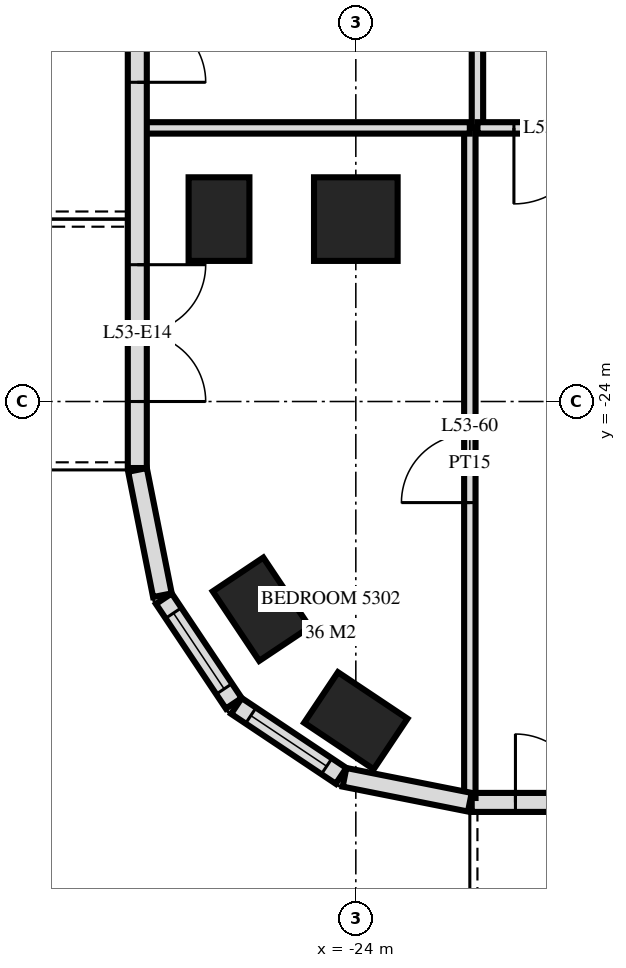
"""IFC4 building model, lengths in metres.
Left out: names, types, materials, properties, quantities, classifications, styles, units other than length and angle.
Written with IfcOpenShell. Run it as: python <this file> out.ifc"""

import sys

from ifc_helpers import new_model, si_unit, direction, frame, frame_2d, origin, origin_2d, place, context, subcontext, project, spatial, rectangle, extrude, element, fill, save


model = new_model("IFC4")
c1 = context("Model", 3, precision=1e-05, world=origin(), true_north=direction((0.0, 1.0)))
c2 = subcontext(c1, "Body", "Model", "MODEL_VIEW")
j1 = project(units=[si_unit("LENGTHUNIT", "METRE"), si_unit("PLANEANGLEUNIT", "RADIAN")], contexts=[c1])
p1 = place(None, origin())
s1 = spatial("IfcSite", under=j1, at=p1, CompositionType="ELEMENT")
p2 = place(p1, origin())
s2 = spatial("IfcBuilding", under=s1, at=p2, CompositionType="ELEMENT")
p3 = place(p2, frame((0.0, 0.0, 204.6)))
s3 = spatial("IfcBuildingStorey", under=s2, at=p3, CompositionType="ELEMENT", Elevation=204.6)
for number, where, z_axis, x_axis in (
    (1, (-25.8, -21.6, 0.0), (0.0, 0.0, 1.0), (0.0, 1.0, 0.0)),
    (2, (-25.244, -26.733, 0.0), (0.0, 0.0, 1.0), (-0.556, 0.831, 0.0)),
    (3, (-24.0, -28.2, 0.0), (0.0, 0.0, 1.0), (-0.831, 0.556, 0.0)),
):
    element("IfcColumn", number, at=place(p3, frame(where, z_axis=z_axis, x_axis=x_axis)), inside=s3, PredefinedType="COLUMN", context=c2, shape_type="SweptSolid", body=[
        extrude(rectangle(XDim=1.1, YDim=0.8, at=origin_2d()), origin(), (0.0, 0.0, 1.0), 3.5),
    ])
p4 = place(p3, frame((-24.0, -21.6, 0.0), z_axis=(0.0, 0.0, 1.0), x_axis=(1.0, 0.0, 0.0)))
e4 = element("IfcColumn", 4, at=p4, inside=s3, PredefinedType="COLUMN", context=c2, shape_type="SweptSolid", body=[
    extrude(rectangle(XDim=1.1, YDim=1.1, at=origin_2d()), origin(), (0.0, 0.0, 1.0), 3.5),
])
p5 = place(p3, frame((-26.875, -3.325, 0.0), z_axis=(0.0, 0.0, 1.0), x_axis=(0.0, -1.0, 0.0)))
e5 = element("IfcWall", 5, at=p5, inside=s3, PredefinedType="SOLIDWALL", context=c2, shape_type="SweptSolid", body=[
    extrude(rectangle(XDim=21.551, YDim=0.25, at=frame_2d((10.775, 0.0))), origin(), (0.0, 0.0, 1.0), 3.22),
])
p6 = place(p5, frame((6.65, 0.0, 0.0)))
e6 = element("IfcOpeningElement", 6, at=p6, cuts=e5, PredefinedType="OPENING", context=c2, shape_type="SweptSolid", body=[
    extrude(rectangle(XDim=1.8, YDim=2.4, at=frame_2d((0.9, 1.2))), frame((0.0, 0.135, 0.0), z_axis=(0.0, -1.0, 0.0), x_axis=(1.0, 0.0, 0.0)), (0.0, 0.0, 1.0), 0.27),
])
p7 = place(p5, frame((12.275, 0.0, 0.9)))
e7 = element("IfcOpeningElement", 7, at=p7, cuts=e5, PredefinedType="OPENING", context=c2, shape_type="SweptSolid", body=[
    extrude(rectangle(XDim=1.2, YDim=1.5, at=frame_2d((0.6, 0.75))), frame((0.0, 0.135, 0.0), z_axis=(0.0, -1.0, 0.0), x_axis=(1.0, 0.0, 0.0)), (0.0, 0.0, 1.0), 0.27),
])
p8 = place(p5, frame((14.675, 0.0, 0.0)))
e8 = element("IfcOpeningElement", 8, at=p8, cuts=e5, PredefinedType="OPENING", context=c2, shape_type="SweptSolid", body=[
    extrude(rectangle(XDim=1.8, YDim=2.4, at=frame_2d((0.9, 1.2))), frame((0.0, 0.135, 0.0), z_axis=(0.0, -1.0, 0.0), x_axis=(1.0, 0.0, 0.0)), (0.0, 0.0, 1.0), 0.27),
])
p9 = place(p5, frame((18.875, 0.0, 0.0)))
e9 = element("IfcOpeningElement", 9, at=p9, cuts=e5, PredefinedType="OPENING", context=c2, shape_type="SweptSolid", body=[
    extrude(rectangle(XDim=1.8, YDim=2.4, at=frame_2d((0.9, 1.2))), frame((0.0, 0.135, 0.0), z_axis=(0.0, -1.0, 0.0), x_axis=(1.0, 0.0, 0.0)), (0.0, 0.0, 1.0), 0.27),
])
p10 = place(p3, frame((-26.873, -24.9, 0.0), z_axis=(0.0, 0.0, 1.0), x_axis=(0.195026884138, -0.980797896849, 0.0)))
e10 = element("IfcWall", 10, at=p10, inside=s3, PredefinedType="SOLIDWALL", context=c2, shape_type="SweptSolid", body=[
    extrude(rectangle(XDim=1.681, YDim=0.25, at=frame_2d((0.841, 0.0))), origin(), (0.0, 0.0, 1.0), 3.22),
])
p11 = place(p3, frame((-26.526, -26.594, 0.0), z_axis=(0.0, 0.0, 1.0), x_axis=(0.55555029066, -0.831482937015, 0.0)))
e11 = element("IfcWall", 11, at=p11, inside=s3, PredefinedType="SOLIDWALL", context=c2, shape_type="SweptSolid", body=[
    extrude(rectangle(XDim=1.656, YDim=0.25, at=frame_2d((0.828, 0.0))), origin(), (0.0, 0.0, 1.0), 3.22),
])
p12 = place(p11, frame((0.228, 0.0, 0.9)))
e12 = element("IfcOpeningElement", 12, at=p12, cuts=e11, PredefinedType="OPENING", context=c2, shape_type="SweptSolid", body=[
    extrude(rectangle(XDim=1.2, YDim=1.5, at=frame_2d((0.6, 0.75))), frame((0.0, 0.135, 0.0), z_axis=(0.0, -1.0, 0.0), x_axis=(1.0, 0.0, 0.0)), (0.0, 0.0, 1.0), 0.27),
])
p13 = place(p3, frame((-25.571, -28.006, 0.0), z_axis=(0.0, 0.0, 1.0), x_axis=(0.831482937015, -0.55555029066, 0.0)))
e13 = element("IfcWall", 13, at=p13, inside=s3, PredefinedType="SOLIDWALL", context=c2, shape_type="SweptSolid", body=[
    extrude(rectangle(XDim=1.656, YDim=0.25, at=frame_2d((0.828, 0.0))), origin(), (0.0, 0.0, 1.0), 3.22),
])
p14 = place(p13, frame((0.228, 0.0, 0.9)))
e14 = element("IfcOpeningElement", 14, at=p14, cuts=e13, PredefinedType="OPENING", context=c2, shape_type="SweptSolid", body=[
    extrude(rectangle(XDim=1.2, YDim=1.5, at=frame_2d((0.6, 0.75))), frame((0.0, 0.135, 0.0), z_axis=(0.0, -1.0, 0.0), x_axis=(1.0, 0.0, 0.0)), (0.0, 0.0, 1.0), 0.27),
])
p15 = place(p3, frame((-24.149, -28.945, 0.0), z_axis=(0.0, 0.0, 1.0), x_axis=(0.980775640221, -0.19513878023, 0.0)))
e15 = element("IfcWall", 15, at=p15, inside=s3, PredefinedType="SOLIDWALL", context=c2, shape_type="SweptSolid", body=[
    extrude(rectangle(XDim=1.681, YDim=0.25, at=frame_2d((0.841, 0.0))), origin(), (0.0, 0.0, 1.0), 3.22),
])
p16 = place(p3, frame((-22.475, -29.275, 0.0), z_axis=(0.0, 0.0, 1.0), x_axis=(1.0, 0.0, 0.0)))
e16 = element("IfcWall", 16, at=p16, inside=s3, PredefinedType="SOLIDWALL", context=c2, shape_type="SweptSolid", body=[
    extrude(rectangle(XDim=44.951, YDim=0.25, at=frame_2d((22.475, 0.0))), origin(), (0.0, 0.0, 1.0), 3.22),
])
p17 = place(p16, frame((0.575, 0.0, 0.0)))
e17 = element("IfcOpeningElement", 17, at=p17, cuts=e16, PredefinedType="OPENING", context=c2, shape_type="SweptSolid", body=[
    extrude(rectangle(XDim=1.8, YDim=2.4, at=frame_2d((0.9, 1.2))), frame((0.0, 0.135, 0.0), z_axis=(0.0, -1.0, 0.0), x_axis=(1.0, 0.0, 0.0)), (0.0, 0.0, 1.0), 0.27),
])
p18 = place(p16, frame((6.2, 0.0, 0.0)))
e18 = element("IfcOpeningElement", 18, at=p18, cuts=e16, PredefinedType="OPENING", context=c2, shape_type="SweptSolid", body=[
    extrude(rectangle(XDim=1.8, YDim=2.4, at=frame_2d((0.9, 1.2))), frame((0.0, 0.135, 0.0), z_axis=(0.0, -1.0, 0.0), x_axis=(1.0, 0.0, 0.0)), (0.0, 0.0, 1.0), 0.27),
])
p19 = place(p16, frame((8.45, 0.0, 0.9)))
e19 = element("IfcOpeningElement", 19, at=p19, cuts=e16, PredefinedType="OPENING", context=c2, shape_type="SweptSolid", body=[
    extrude(rectangle(XDim=1.8, YDim=1.5, at=frame_2d((0.9, 0.75))), frame((0.0, 0.135, 0.0), z_axis=(0.0, -1.0, 0.0), x_axis=(1.0, 0.0, 0.0)), (0.0, 0.0, 1.0), 0.27),
])
p20 = place(p16, frame((11.075, 0.0, 0.0)))
e20 = element("IfcOpeningElement", 20, at=p20, cuts=e16, PredefinedType="OPENING", context=c2, shape_type="SweptSolid", body=[
    extrude(rectangle(XDim=1.8, YDim=2.4, at=frame_2d((0.9, 1.2))), frame((0.0, 0.135, 0.0), z_axis=(0.0, -1.0, 0.0), x_axis=(1.0, 0.0, 0.0)), (0.0, 0.0, 1.0), 0.27),
])
p21 = place(p16, frame((13.775, 0.0, 0.9)))
e21 = element("IfcOpeningElement", 21, at=p21, cuts=e16, PredefinedType="OPENING", context=c2, shape_type="SweptSolid", body=[
    extrude(rectangle(XDim=2.4, YDim=1.5, at=frame_2d((1.2, 0.75))), frame((0.0, 0.135, 0.0), z_axis=(0.0, -1.0, 0.0), x_axis=(1.0, 0.0, 0.0)), (0.0, 0.0, 1.0), 0.27),
])
p22 = place(p16, frame((16.775, 0.0, 0.9)))
e22 = element("IfcOpeningElement", 22, at=p22, cuts=e16, PredefinedType="OPENING", context=c2, shape_type="SweptSolid", body=[
    extrude(rectangle(XDim=2.4, YDim=1.5, at=frame_2d((1.2, 0.75))), frame((0.0, 0.135, 0.0), z_axis=(0.0, -1.0, 0.0), x_axis=(1.0, 0.0, 0.0)), (0.0, 0.0, 1.0), 0.27),
])
p23 = place(p16, frame((20.075, 0.0, 0.0)))
e23 = element("IfcOpeningElement", 23, at=p23, cuts=e16, PredefinedType="OPENING", context=c2, shape_type="SweptSolid", body=[
    extrude(rectangle(XDim=1.8, YDim=2.4, at=frame_2d((0.9, 1.2))), frame((0.0, 0.135, 0.0), z_axis=(0.0, -1.0, 0.0), x_axis=(1.0, 0.0, 0.0)), (0.0, 0.0, 1.0), 0.27),
])
p24 = place(p16, frame((23.075, 0.0, 0.0)))
e24 = element("IfcOpeningElement", 24, at=p24, cuts=e16, PredefinedType="OPENING", context=c2, shape_type="SweptSolid", body=[
    extrude(rectangle(XDim=1.8, YDim=2.4, at=frame_2d((0.9, 1.2))), frame((0.0, 0.135, 0.0), z_axis=(0.0, -1.0, 0.0), x_axis=(1.0, 0.0, 0.0)), (0.0, 0.0, 1.0), 0.27),
])
p25 = place(p16, frame((25.775, 0.0, 0.9)))
e25 = element("IfcOpeningElement", 25, at=p25, cuts=e16, PredefinedType="OPENING", context=c2, shape_type="SweptSolid", body=[
    extrude(rectangle(XDim=2.4, YDim=1.5, at=frame_2d((1.2, 0.75))), frame((0.0, 0.135, 0.0), z_axis=(0.0, -1.0, 0.0), x_axis=(1.0, 0.0, 0.0)), (0.0, 0.0, 1.0), 0.27),
])
p26 = place(p16, frame((29.075, 0.0, 0.0)))
e26 = element("IfcOpeningElement", 26, at=p26, cuts=e16, PredefinedType="OPENING", context=c2, shape_type="SweptSolid", body=[
    extrude(rectangle(XDim=1.8, YDim=2.4, at=frame_2d((0.9, 1.2))), frame((0.0, 0.135, 0.0), z_axis=(0.0, -1.0, 0.0), x_axis=(1.0, 0.0, 0.0)), (0.0, 0.0, 1.0), 0.27),
])
p27 = place(p16, frame((31.775, 0.0, 0.9)))
e27 = element("IfcOpeningElement", 27, at=p27, cuts=e16, PredefinedType="OPENING", context=c2, shape_type="SweptSolid", body=[
    extrude(rectangle(XDim=2.4, YDim=1.5, at=frame_2d((1.2, 0.75))), frame((0.0, 0.135, 0.0), z_axis=(0.0, -1.0, 0.0), x_axis=(1.0, 0.0, 0.0)), (0.0, 0.0, 1.0), 0.27),
])
p28 = place(p16, frame((34.775, 0.0, 0.9)))
e28 = element("IfcOpeningElement", 28, at=p28, cuts=e16, PredefinedType="OPENING", context=c2, shape_type="SweptSolid", body=[
    extrude(rectangle(XDim=2.4, YDim=1.5, at=frame_2d((1.2, 0.75))), frame((0.0, 0.135, 0.0), z_axis=(0.0, -1.0, 0.0), x_axis=(1.0, 0.0, 0.0)), (0.0, 0.0, 1.0), 0.27),
])
p29 = place(p16, frame((38.075, 0.0, 0.0)))
e29 = element("IfcOpeningElement", 29, at=p29, cuts=e16, PredefinedType="OPENING", context=c2, shape_type="SweptSolid", body=[
    extrude(rectangle(XDim=1.8, YDim=2.4, at=frame_2d((0.9, 1.2))), frame((0.0, 0.135, 0.0), z_axis=(0.0, -1.0, 0.0), x_axis=(1.0, 0.0, 0.0)), (0.0, 0.0, 1.0), 0.27),
])
p30 = place(p16, frame((41.075, 0.0, 0.0)))
e30 = element("IfcOpeningElement", 30, at=p30, cuts=e16, PredefinedType="OPENING", context=c2, shape_type="SweptSolid", body=[
    extrude(rectangle(XDim=1.8, YDim=2.4, at=frame_2d((0.9, 1.2))), frame((0.0, 0.135, 0.0), z_axis=(0.0, -1.0, 0.0), x_axis=(1.0, 0.0, 0.0)), (0.0, 0.0, 1.0), 0.27),
])
p31 = place(p3, frame((-22.4, -20.4, 0.0), z_axis=(0.0, 0.0, 1.0), x_axis=(0.0, 1.0, 0.0)))
e31 = element("IfcWall", 31, at=p31, inside=s3, PredefinedType="PARTITIONING", context=c2, shape_type="SweptSolid", body=[
    extrude(rectangle(XDim=3.0, YDim=0.15, at=frame_2d((1.5, 0.0))), origin(), (0.0, 0.0, 1.0), 3.22),
])
p32 = place(p3, frame((-22.5, -29.217, 0.0), z_axis=(0.0, 0.0, 1.0), x_axis=(0.0, 1.0, 0.0)))
e32 = element("IfcWall", 32, at=p32, inside=s3, PredefinedType="PARTITIONING", context=c2, shape_type="SweptSolid", body=[
    extrude(rectangle(XDim=8.817, YDim=0.15, at=frame_2d((4.408, 0.0))), origin(), (0.0, 0.0, 1.0), 3.22),
])
p33 = place(p32, frame((3.886, 0.0, 0.0)))
e33 = element("IfcOpeningElement", 33, at=p33, cuts=e32, PredefinedType="OPENING", context=c2, shape_type="SweptSolid", body=[
    extrude(rectangle(XDim=0.9, YDim=2.1, at=frame_2d((0.45, 1.05))), frame((0.0, 0.085, 0.0), z_axis=(0.0, -1.0, 0.0), x_axis=(1.0, 0.0, 0.0)), (0.0, 0.0, 1.0), 0.17),
])
p34 = place(p3, frame((-22.4, -20.4, 0.0), z_axis=(0.0, 0.0, 1.0), x_axis=(1.0, 0.0, 0.0)))
e34 = element("IfcWall", 34, at=p34, inside=s3, PredefinedType="PARTITIONING", context=c2, shape_type="SweptSolid", body=[
    extrude(rectangle(XDim=2.0, YDim=0.15, at=frame_2d((1.0, 0.0))), origin(), (0.0, 0.0, 1.0), 3.22),
])
p35 = place(p34, frame((0.48, 0.0, 0.0)))
e35 = element("IfcOpeningElement", 35, at=p35, cuts=e34, PredefinedType="OPENING", context=c2, shape_type="SweptSolid", body=[
    extrude(rectangle(XDim=1.0, YDim=2.1, at=frame_2d((0.5, 1.05))), frame((0.0, 0.085, 0.0), z_axis=(0.0, -1.0, 0.0), x_axis=(1.0, 0.0, 0.0)), (0.0, 0.0, 1.0), 0.17),
])
p36 = place(p3, frame((-26.82, -20.4, 0.0), z_axis=(0.0, 0.0, 1.0), x_axis=(1.0, 0.0, 0.0)))
e36 = element("IfcWall", 36, at=p36, inside=s3, PredefinedType="PARTITIONING", context=c2, shape_type="SweptSolid", body=[
    extrude(rectangle(XDim=4.32, YDim=0.15, at=frame_2d((2.16, 0.0))), origin(), (0.0, 0.0, 1.0), 3.22),
])
p37 = place(p12, origin())
e37 = element("IfcWindow", 37, at=p37, inside=s3, PartitioningType="SINGLE_PANEL", PredefinedType="WINDOW", context=c2, shape_type="SweptSolid", body=[
    extrude(rectangle(XDim=1.2, YDim=1.5, at=frame_2d((0.6, 0.75))), frame((0.0, 0.03, 0.0), z_axis=(0.0, -1.0, 0.0), x_axis=(1.0, 0.0, 0.0)), (0.0, 0.0, 1.0), 0.06),
])
fill(e12, e37)
p38 = place(p14, origin())
e38 = element("IfcWindow", 38, at=p38, inside=s3, PartitioningType="SINGLE_PANEL", PredefinedType="WINDOW", context=c2, shape_type="SweptSolid", body=[
    extrude(rectangle(XDim=1.2, YDim=1.5, at=frame_2d((0.6, 0.75))), frame((0.0, 0.03, 0.0), z_axis=(0.0, -1.0, 0.0), x_axis=(1.0, 0.0, 0.0)), (0.0, 0.0, 1.0), 0.06),
])
fill(e14, e38)
p39 = place(p17, origin())
e39 = element("IfcDoor", 39, at=p39, inside=s3, OperationType="DOUBLE_DOOR_SINGLE_SWING", PredefinedType="DOOR", context=c2, shape_type="SweptSolid", body=[
    extrude(rectangle(XDim=1.8, YDim=2.4, at=frame_2d((0.9, 1.2))), frame((0.0, 0.025, 0.0), z_axis=(0.0, -1.0, 0.0), x_axis=(1.0, 0.0, 0.0)), (0.0, 0.0, 1.0), 0.05),
])
fill(e17, e39)
p40 = place(p8, origin())
e40 = element("IfcDoor", 40, at=p40, inside=s3, OperationType="DOUBLE_DOOR_SINGLE_SWING", PredefinedType="DOOR", context=c2, shape_type="SweptSolid", body=[
    extrude(rectangle(XDim=1.8, YDim=2.4, at=frame_2d((0.9, 1.2))), frame((0.0, 0.025, 0.0), z_axis=(0.0, -1.0, 0.0), x_axis=(1.0, 0.0, 0.0)), (0.0, 0.0, 1.0), 0.05),
])
fill(e8, e40)
p41 = place(p9, origin())
e41 = element("IfcDoor", 41, at=p41, inside=s3, OperationType="DOUBLE_DOOR_SINGLE_SWING", PredefinedType="DOOR", context=c2, shape_type="SweptSolid", body=[
    extrude(rectangle(XDim=1.8, YDim=2.4, at=frame_2d((0.9, 1.2))), frame((0.0, 0.025, 0.0), z_axis=(0.0, -1.0, 0.0), x_axis=(1.0, 0.0, 0.0)), (0.0, 0.0, 1.0), 0.05),
])
fill(e9, e41)
p42 = place(p35, frame((0.5, 0.0, 0.0), z_axis=(0.0, 0.0, 1.0), x_axis=(-1.0, 0.0, 0.0)))
e42 = element("IfcDoor", 42, at=p42, inside=s3, OperationType="SINGLE_SWING_LEFT", PredefinedType="DOOR", context=c2, shape_type="SweptSolid", body=[
    extrude(rectangle(XDim=1.0, YDim=2.1, at=frame_2d((0.0, 1.05))), frame((0.0, -0.025, 0.0), z_axis=(0.0, 1.0, 0.0), x_axis=(-1.0, 0.0, 0.0)), (0.0, 0.0, 1.0), 0.05),
])
fill(e35, e42)
p43 = place(p33, origin())
e43 = element("IfcDoor", 43, at=p43, inside=s3, OperationType="SINGLE_SWING_RIGHT", PredefinedType="DOOR", context=c2, shape_type="SweptSolid", body=[
    extrude(rectangle(XDim=0.9, YDim=2.1, at=frame_2d((0.45, 1.05))), frame((0.0, 0.025, 0.0), z_axis=(0.0, -1.0, 0.0), x_axis=(1.0, 0.0, 0.0)), (0.0, 0.0, 1.0), 0.05),
])
fill(e33, e43)
save(model, sys.argv[1])
